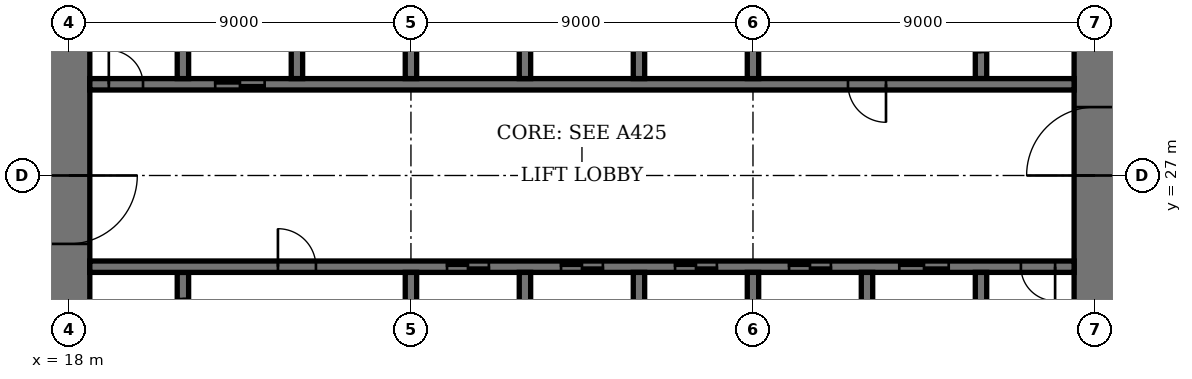
"""IFC4 building model, lengths in metres.
Left out: names, types, materials, properties, quantities, classifications, styles, units other than length and angle.
Written with IfcOpenShell. Run it as: python <this file> out.ifc"""

import sys

from ifc_helpers import new_model, si_unit, direction, frame, frame_2d, origin, place, context, subcontext, project, spatial, rectangle, extrude, element, fill, save


model = new_model("IFC4")
c1 = context("Model", 3, precision=1e-05, world=origin(), true_north=direction((0.0, 1.0)))
c2 = subcontext(c1, "Body", "Model", "MODEL_VIEW")
j1 = project(units=[si_unit("LENGTHUNIT", "METRE"), si_unit("PLANEANGLEUNIT", "RADIAN")], contexts=[c1])
p1 = place(None, origin())
s1 = spatial("IfcSite", under=j1, at=p1, CompositionType="ELEMENT")
p2 = place(p1, origin())
s2 = spatial("IfcBuilding", under=s1, at=p2, CompositionType="ELEMENT")
p3 = place(p2, frame((0.0, 0.0, 47.8)))
s3 = spatial("IfcBuildingStorey", under=s2, at=p3, CompositionType="ELEMENT", Elevation=47.8)
p4 = place(p3, frame((18.0, 35.45, 0.0), z_axis=(0.0, 0.0, 1.0), x_axis=(0.0, -1.0, 0.0)))
e1 = element("IfcWall", 1, at=p4, inside=s3, PredefinedType="SHEAR", context=c2, shape_type="SweptSolid", body=[
    extrude(rectangle(XDim=16.9, YDim=1.1, at=frame_2d((8.45, 0.0))), origin(), (0.0, 0.0, 1.0), 4.0),
])
p5 = place(p4, frame((8.45, 0.0, 0.0)))
e2 = element("IfcOpeningElement", 2, at=p5, cuts=e1, PredefinedType="OPENING", context=c2, shape_type="SweptSolid", body=[
    extrude(rectangle(XDim=1.8, YDim=2.4, at=frame_2d((0.9, 1.2))), frame((0.0, 0.56, 0.0), z_axis=(0.0, -1.0, 0.0), x_axis=(1.0, 0.0, 0.0)), (0.0, 0.0, 1.0), 1.12),
])
p6 = place(p3, frame((45.0, 18.55, 0.0), z_axis=(0.0, 0.0, 1.0), x_axis=(0.0, 1.0, 0.0)))
e3 = element("IfcWall", 3, at=p6, inside=s3, PredefinedType="SHEAR", context=c2, shape_type="SweptSolid", body=[
    extrude(rectangle(XDim=16.9, YDim=1.1, at=frame_2d((8.45, 0.0))), origin(), (0.0, 0.0, 1.0), 4.0),
])
p7 = place(p6, frame((8.45, 0.0, 0.0)))
e4 = element("IfcOpeningElement", 4, at=p7, cuts=e3, PredefinedType="OPENING", context=c2, shape_type="SweptSolid", body=[
    extrude(rectangle(XDim=1.8, YDim=2.4, at=frame_2d((0.9, 1.2))), frame((0.0, 0.56, 0.0), z_axis=(0.0, -1.0, 0.0), x_axis=(1.0, 0.0, 0.0)), (0.0, 0.0, 1.0), 1.12),
])
p8 = place(p3, frame((21.0, 21.95, 0.0), z_axis=(0.0, 0.0, 1.0), x_axis=(0.0, 1.0, 0.0)))
e5 = element("IfcWall", 5, at=p8, inside=s3, PredefinedType="SHEAR", context=c2, shape_type="SweptSolid", body=[
    extrude(rectangle(XDim=2.5, YDim=0.3, at=frame_2d((1.25, 0.0))), origin(), (0.0, 0.0, 1.0), 4.0),
])
p9 = place(p8, frame((0.7, 0.0, 0.0)))
e6 = element("IfcOpeningElement", 6, at=p9, cuts=e5, PredefinedType="OPENING", context=c2, shape_type="SweptSolid", body=[
    extrude(rectangle(XDim=1.1, YDim=2.4, at=frame_2d((0.55, 1.2))), frame((0.0, 0.16, 0.0), z_axis=(0.0, -1.0, 0.0), x_axis=(1.0, 0.0, 0.0)), (0.0, 0.0, 1.0), 0.32),
])
p10 = place(p3, frame((42.0, 29.55, 0.0), z_axis=(0.0, 0.0, 1.0), x_axis=(0.0, 1.0, 0.0)))
e7 = element("IfcWall", 7, at=p10, inside=s3, PredefinedType="SHEAR", context=c2, shape_type="SweptSolid", body=[
    extrude(rectangle(XDim=2.5, YDim=0.3, at=frame_2d((1.25, 0.0))), origin(), (0.0, 0.0, 1.0), 4.0),
])
p11 = place(p10, frame((0.7, 0.0, 0.0)))
e8 = element("IfcOpeningElement", 8, at=p11, cuts=e7, PredefinedType="OPENING", context=c2, shape_type="SweptSolid", body=[
    extrude(rectangle(XDim=1.1, YDim=2.4, at=frame_2d((0.55, 1.2))), frame((0.0, 0.16, 0.0), z_axis=(0.0, -1.0, 0.0), x_axis=(1.0, 0.0, 0.0)), (0.0, 0.0, 1.0), 0.32),
])
p12 = place(p3, frame((18.55, 24.6, 0.0), z_axis=(0.0, 0.0, 1.0), x_axis=(1.0, 0.0, 0.0)))
e9 = element("IfcWall", 9, at=p12, inside=s3, PredefinedType="SHEAR", context=c2, shape_type="SweptSolid", body=[
    extrude(rectangle(XDim=25.9, YDim=0.3, at=frame_2d((12.95, 0.0))), origin(), (0.0, 0.0, 1.0), 4.0),
])
p13 = place(p12, frame((4.95, 0.0, 0.0)))
e10 = element("IfcOpeningElement", 10, at=p13, cuts=e9, PredefinedType="OPENING", context=c2, shape_type="SweptSolid", body=[
    extrude(rectangle(XDim=1.0, YDim=2.4, at=frame_2d((0.5, 1.2))), frame((0.0, 0.16, 0.0), z_axis=(0.0, -1.0, 0.0), x_axis=(1.0, 0.0, 0.0)), (0.0, 0.0, 1.0), 0.32),
])
p14 = place(p12, frame((24.5, 0.0, 0.0)))
e11 = element("IfcOpeningElement", 11, at=p14, cuts=e9, PredefinedType="OPENING", context=c2, shape_type="SweptSolid", body=[
    extrude(rectangle(XDim=0.9, YDim=2.1, at=frame_2d((0.45, 1.05))), frame((0.0, 0.16, 0.0), z_axis=(0.0, -1.0, 0.0), x_axis=(1.0, 0.0, 0.0)), (0.0, 0.0, 1.0), 0.32),
])
p15 = place(p12, frame((9.4, 0.0, 0.0)))
e12 = element("IfcOpeningElement", 12, at=p15, cuts=e9, PredefinedType="OPENING", context=c2, shape_type="SweptSolid", body=[
    extrude(rectangle(XDim=1.1, YDim=2.4, at=frame_2d((0.55, 1.2))), frame((0.0, 0.16, 0.0), z_axis=(0.0, -1.0, 0.0), x_axis=(1.0, 0.0, 0.0)), (0.0, 0.0, 1.0), 0.32),
])
p16 = place(p12, frame((12.4, 0.0, 0.0)))
e13 = element("IfcOpeningElement", 13, at=p16, cuts=e9, PredefinedType="OPENING", context=c2, shape_type="SweptSolid", body=[
    extrude(rectangle(XDim=1.1, YDim=2.4, at=frame_2d((0.55, 1.2))), frame((0.0, 0.16, 0.0), z_axis=(0.0, -1.0, 0.0), x_axis=(1.0, 0.0, 0.0)), (0.0, 0.0, 1.0), 0.32),
])
p17 = place(p12, frame((15.4, 0.0, 0.0)))
e14 = element("IfcOpeningElement", 14, at=p17, cuts=e9, PredefinedType="OPENING", context=c2, shape_type="SweptSolid", body=[
    extrude(rectangle(XDim=1.1, YDim=2.4, at=frame_2d((0.55, 1.2))), frame((0.0, 0.16, 0.0), z_axis=(0.0, -1.0, 0.0), x_axis=(1.0, 0.0, 0.0)), (0.0, 0.0, 1.0), 0.32),
])
p18 = place(p12, frame((18.4, 0.0, 0.0)))
e15 = element("IfcOpeningElement", 15, at=p18, cuts=e9, PredefinedType="OPENING", context=c2, shape_type="SweptSolid", body=[
    extrude(rectangle(XDim=1.1, YDim=2.4, at=frame_2d((0.55, 1.2))), frame((0.0, 0.16, 0.0), z_axis=(0.0, -1.0, 0.0), x_axis=(1.0, 0.0, 0.0)), (0.0, 0.0, 1.0), 0.32),
])
p19 = place(p12, frame((21.3, 0.0, 0.0)))
e16 = element("IfcOpeningElement", 16, at=p19, cuts=e9, PredefinedType="OPENING", context=c2, shape_type="SweptSolid", body=[
    extrude(rectangle(XDim=1.3, YDim=2.4, at=frame_2d((0.65, 1.2))), frame((0.0, 0.16, 0.0), z_axis=(0.0, -1.0, 0.0), x_axis=(1.0, 0.0, 0.0)), (0.0, 0.0, 1.0), 0.32),
])
p20 = place(p3, frame((18.55, 29.4, 0.0), z_axis=(0.0, 0.0, 1.0), x_axis=(1.0, 0.0, 0.0)))
e17 = element("IfcWall", 17, at=p20, inside=s3, PredefinedType="SHEAR", context=c2, shape_type="SweptSolid", body=[
    extrude(rectangle(XDim=25.9, YDim=0.3, at=frame_2d((12.95, 0.0))), origin(), (0.0, 0.0, 1.0), 4.0),
])
p21 = place(p20, frame((19.95, 0.0, 0.0)))
e18 = element("IfcOpeningElement", 18, at=p21, cuts=e17, PredefinedType="OPENING", context=c2, shape_type="SweptSolid", body=[
    extrude(rectangle(XDim=1.0, YDim=2.4, at=frame_2d((0.5, 1.2))), frame((0.0, 0.16, 0.0), z_axis=(0.0, -1.0, 0.0), x_axis=(1.0, 0.0, 0.0)), (0.0, 0.0, 1.0), 0.32),
])
p22 = place(p20, frame((0.5, 0.0, 0.0)))
e19 = element("IfcOpeningElement", 19, at=p22, cuts=e17, PredefinedType="OPENING", context=c2, shape_type="SweptSolid", body=[
    extrude(rectangle(XDim=0.9, YDim=2.1, at=frame_2d((0.45, 1.05))), frame((0.0, 0.16, 0.0), z_axis=(0.0, -1.0, 0.0), x_axis=(1.0, 0.0, 0.0)), (0.0, 0.0, 1.0), 0.32),
])
p23 = place(p20, frame((3.3, 0.0, 0.0)))
e20 = element("IfcOpeningElement", 20, at=p23, cuts=e17, PredefinedType="OPENING", context=c2, shape_type="SweptSolid", body=[
    extrude(rectangle(XDim=1.3, YDim=2.4, at=frame_2d((0.65, 1.2))), frame((0.0, 0.16, 0.0), z_axis=(0.0, -1.0, 0.0), x_axis=(1.0, 0.0, 0.0)), (0.0, 0.0, 1.0), 0.32),
])
for number, where, z_axis, x_axis in (
    (21, (30.0, 21.75, 0.0), (0.0, 0.0, 1.0), (0.0, 1.0, 0.0)),
    (22, (33.0, 29.55, 0.0), (0.0, 0.0, 1.0), (0.0, 1.0, 0.0)),
    (23, (33.0, 21.75, 0.0), (0.0, 0.0, 1.0), (0.0, 1.0, 0.0)),
    (24, (30.0, 29.55, 0.0), (0.0, 0.0, 1.0), (0.0, 1.0, 0.0)),
    (25, (36.0, 21.75, 0.0), (0.0, 0.0, 1.0), (0.0, 1.0, 0.0)),
    (26, (27.0, 29.55, 0.0), (0.0, 0.0, 1.0), (0.0, 1.0, 0.0)),
):
    element("IfcWall", number, at=place(p3, frame(where, z_axis=z_axis, x_axis=x_axis)), inside=s3, PredefinedType="SHEAR", context=c2, shape_type="SweptSolid", body=[
        extrude(rectangle(XDim=2.7, YDim=0.3, at=frame_2d((1.35, 0.0))), origin(), (0.0, 0.0, 1.0), 4.0),
    ])
for number, where, z_axis, x_axis in (
    (27, (39.0, 18.55, 0.0), (0.0, 0.0, 1.0), (0.0, 1.0, 0.0)),
    (28, (24.0, 29.55, 0.0), (0.0, 0.0, 1.0), (0.0, 1.0, 0.0)),
):
    element("IfcWall", number, at=place(p3, frame(where, z_axis=z_axis, x_axis=x_axis)), inside=s3, PredefinedType="SHEAR", context=c2, shape_type="SweptSolid", body=[
        extrude(rectangle(XDim=5.9, YDim=0.3, at=frame_2d((2.95, 0.0))), origin(), (0.0, 0.0, 1.0), 4.0),
    ])
for number, where, z_axis, x_axis in (
    (29, (42.0, 21.75, 0.0), (0.0, 0.0, 1.0), (0.0, 1.0, 0.0)),
    (30, (21.0, 29.55, 0.0), (0.0, 0.0, 1.0), (0.0, 1.0, 0.0)),
):
    element("IfcWall", number, at=place(p3, frame(where, z_axis=z_axis, x_axis=x_axis)), inside=s3, PredefinedType="SHEAR", context=c2, shape_type="SweptSolid", body=[
        extrude(rectangle(XDim=2.7, YDim=0.3, at=frame_2d((1.35, 0.0))), origin(), (0.0, 0.0, 1.0), 4.0),
    ])
for number, where, z_axis, x_axis in (
    (31, (27.0, 21.6, 0.0), (0.0, 0.0, 1.0), (0.0, 1.0, 0.0)),
    (32, (36.0, 29.55, 0.0), (0.0, 0.0, 1.0), (0.0, 1.0, 0.0)),
):
    element("IfcWall", number, at=place(p3, frame(where, z_axis=z_axis, x_axis=x_axis)), inside=s3, PredefinedType="SHEAR", context=c2, shape_type="SweptSolid", body=[
        extrude(rectangle(XDim=2.85, YDim=0.3, at=frame_2d((1.425, 0.0))), origin(), (0.0, 0.0, 1.0), 4.0),
    ])
p24 = place(p5, origin())
e33 = element("IfcDoor", 33, at=p24, inside=s3, OperationType="DOUBLE_DOOR_DOUBLE_SWING", PredefinedType="DOOR", context=c2, shape_type="SweptSolid", body=[
    extrude(rectangle(XDim=1.8, YDim=2.4, at=frame_2d((0.9, 1.2))), frame((0.0, 0.03, 0.0), z_axis=(0.0, -1.0, 0.0), x_axis=(1.0, 0.0, 0.0)), (0.0, 0.0, 1.0), 0.06),
    extrude(rectangle(XDim=0.04, YDim=2.4, at=frame_2d((0.02, 1.2))), frame((0.0, 0.55, 0.0), z_axis=(0.0, -1.0, 0.0), x_axis=(1.0, 0.0, 0.0)), (0.0, 0.0, 1.0), 1.1),
    extrude(rectangle(XDim=0.04, YDim=2.4, at=frame_2d((1.78, 1.2))), frame((0.0, 0.55, 0.0), z_axis=(0.0, -1.0, 0.0), x_axis=(1.0, 0.0, 0.0)), (0.0, 0.0, 1.0), 1.1),
    extrude(rectangle(XDim=1.8, YDim=0.04, at=frame_2d((0.9, 2.38))), frame((0.0, 0.55, 0.0), z_axis=(0.0, -1.0, 0.0), x_axis=(1.0, 0.0, 0.0)), (0.0, 0.0, 1.0), 1.1),
])
fill(e2, e33)
p25 = place(p7, origin())
e34 = element("IfcDoor", 34, at=p25, inside=s3, OperationType="DOUBLE_DOOR_DOUBLE_SWING", PredefinedType="DOOR", context=c2, shape_type="SweptSolid", body=[
    extrude(rectangle(XDim=1.8, YDim=2.4, at=frame_2d((0.9, 1.2))), frame((0.0, 0.03, 0.0), z_axis=(0.0, -1.0, 0.0), x_axis=(1.0, 0.0, 0.0)), (0.0, 0.0, 1.0), 0.06),
    extrude(rectangle(XDim=0.04, YDim=2.4, at=frame_2d((0.02, 1.2))), frame((0.0, 0.55, 0.0), z_axis=(0.0, -1.0, 0.0), x_axis=(1.0, 0.0, 0.0)), (0.0, 0.0, 1.0), 1.1),
    extrude(rectangle(XDim=0.04, YDim=2.4, at=frame_2d((1.78, 1.2))), frame((0.0, 0.55, 0.0), z_axis=(0.0, -1.0, 0.0), x_axis=(1.0, 0.0, 0.0)), (0.0, 0.0, 1.0), 1.1),
    extrude(rectangle(XDim=1.8, YDim=0.04, at=frame_2d((0.9, 2.38))), frame((0.0, 0.55, 0.0), z_axis=(0.0, -1.0, 0.0), x_axis=(1.0, 0.0, 0.0)), (0.0, 0.0, 1.0), 1.1),
])
fill(e4, e34)
p26 = place(p13, origin())
e35 = element("IfcDoor", 35, at=p26, inside=s3, OperationType="SINGLE_SWING_RIGHT", PredefinedType="DOOR", context=c2, shape_type="SweptSolid", body=[
    extrude(rectangle(XDim=1.0, YDim=2.4, at=frame_2d((0.5, 1.2))), frame((0.0, 0.03, 0.0), z_axis=(0.0, -1.0, 0.0), x_axis=(1.0, 0.0, 0.0)), (0.0, 0.0, 1.0), 0.06),
])
fill(e10, e35)
p27 = place(p21, origin())
e36 = element("IfcDoor", 36, at=p27, inside=s3, OperationType="SINGLE_SWING_RIGHT", PredefinedType="DOOR", context=c2, shape_type="SweptSolid", body=[
    extrude(rectangle(XDim=1.0, YDim=2.4, at=frame_2d((0.5, 1.2))), frame((0.0, 0.03, 0.0), z_axis=(0.0, -1.0, 0.0), x_axis=(1.0, 0.0, 0.0)), (0.0, 0.0, 1.0), 0.06),
])
fill(e18, e36)
p28 = place(p14, origin())
e37 = element("IfcDoor", 37, at=p28, inside=s3, OperationType="SINGLE_SWING_RIGHT", PredefinedType="DOOR", context=c2, shape_type="SweptSolid", body=[
    extrude(rectangle(XDim=0.9, YDim=2.1, at=frame_2d((0.45, 1.05))), frame((0.0, 0.03, 0.0), z_axis=(0.0, -1.0, 0.0), x_axis=(1.0, 0.0, 0.0)), (0.0, 0.0, 1.0), 0.06),
])
fill(e11, e37)
p29 = place(p22, origin())
e38 = element("IfcDoor", 38, at=p29, inside=s3, OperationType="SINGLE_SWING_RIGHT", PredefinedType="DOOR", context=c2, shape_type="SweptSolid", body=[
    extrude(rectangle(XDim=0.9, YDim=2.1, at=frame_2d((0.45, 1.05))), frame((0.0, 0.03, 0.0), z_axis=(0.0, -1.0, 0.0), x_axis=(1.0, 0.0, 0.0)), (0.0, 0.0, 1.0), 0.06),
])
fill(e19, e38)
p30 = place(p15, origin())
e39 = element("IfcDoor", 39, at=p30, inside=s3, OperationType="DOUBLE_DOOR_SLIDING", PredefinedType="DOOR", context=c2, shape_type="SweptSolid", body=[
    extrude(rectangle(XDim=1.1, YDim=2.4, at=frame_2d((0.55, 1.2))), frame((0.0, 0.02, 0.0), z_axis=(0.0, -1.0, 0.0), x_axis=(1.0, 0.0, 0.0)), (0.0, 0.0, 1.0), 0.04),
])
fill(e12, e39)
p31 = place(p16, origin())
e40 = element("IfcDoor", 40, at=p31, inside=s3, OperationType="DOUBLE_DOOR_SLIDING", PredefinedType="DOOR", context=c2, shape_type="SweptSolid", body=[
    extrude(rectangle(XDim=1.1, YDim=2.4, at=frame_2d((0.55, 1.2))), frame((0.0, 0.02, 0.0), z_axis=(0.0, -1.0, 0.0), x_axis=(1.0, 0.0, 0.0)), (0.0, 0.0, 1.0), 0.04),
])
fill(e13, e40)
p32 = place(p17, origin())
e41 = element("IfcDoor", 41, at=p32, inside=s3, OperationType="DOUBLE_DOOR_SLIDING", PredefinedType="DOOR", context=c2, shape_type="SweptSolid", body=[
    extrude(rectangle(XDim=1.1, YDim=2.4, at=frame_2d((0.55, 1.2))), frame((0.0, 0.02, 0.0), z_axis=(0.0, -1.0, 0.0), x_axis=(1.0, 0.0, 0.0)), (0.0, 0.0, 1.0), 0.04),
])
fill(e14, e41)
p33 = place(p18, origin())
e42 = element("IfcDoor", 42, at=p33, inside=s3, OperationType="DOUBLE_DOOR_SLIDING", PredefinedType="DOOR", context=c2, shape_type="SweptSolid", body=[
    extrude(rectangle(XDim=1.1, YDim=2.4, at=frame_2d((0.55, 1.2))), frame((0.0, 0.02, 0.0), z_axis=(0.0, -1.0, 0.0), x_axis=(1.0, 0.0, 0.0)), (0.0, 0.0, 1.0), 0.04),
])
fill(e15, e42)
p34 = place(p19, origin())
e43 = element("IfcDoor", 43, at=p34, inside=s3, OperationType="DOUBLE_DOOR_SLIDING", PredefinedType="DOOR", context=c2, shape_type="SweptSolid", body=[
    extrude(rectangle(XDim=1.3, YDim=2.4, at=frame_2d((0.65, 1.2))), frame((0.0, 0.02, 0.0), z_axis=(0.0, -1.0, 0.0), x_axis=(1.0, 0.0, 0.0)), (0.0, 0.0, 1.0), 0.04),
])
fill(e16, e43)
p35 = place(p23, origin())
e44 = element("IfcDoor", 44, at=p35, inside=s3, OperationType="DOUBLE_DOOR_SLIDING", PredefinedType="DOOR", context=c2, shape_type="SweptSolid", body=[
    extrude(rectangle(XDim=1.3, YDim=2.4, at=frame_2d((0.65, 1.2))), frame((0.0, 0.02, 0.0), z_axis=(0.0, -1.0, 0.0), x_axis=(1.0, 0.0, 0.0)), (0.0, 0.0, 1.0), 0.04),
])
fill(e20, e44)
save(model, sys.argv[1])
